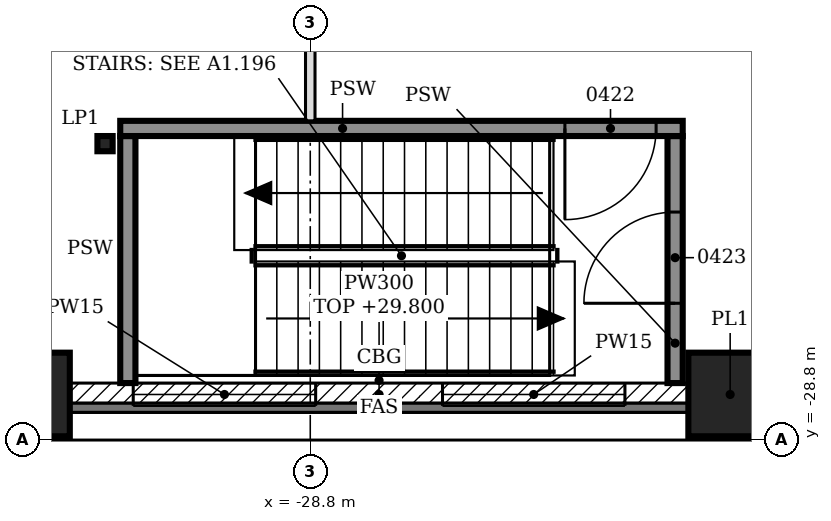
"""IFC4 building model, lengths in metres.
Left out: names, types, materials, properties, quantities, classifications, styles, units other than length and angle.
Written with IfcOpenShell. Run it as: python <this file> out.ifc"""

import sys

from ifc_helpers import new_model, si_unit, direction, frame, frame_2d, origin, origin_2d, place, context, subcontext, project, spatial, polyline, rectangle, hollow_rectangle, i_section, outline, extrude, element, fill, save


model = new_model("IFC4")
c1 = context("Model", 3, precision=1e-05, world=origin(), true_north=direction((0.0, 1.0)))
c2 = subcontext(c1, "Body", "Model", "MODEL_VIEW")
j1 = project(units=[si_unit("LENGTHUNIT", "METRE"), si_unit("PLANEANGLEUNIT", "RADIAN")], contexts=[c1])
p1 = place(None, origin())
s1 = spatial("IfcSite", under=j1, at=p1, CompositionType="ELEMENT")
p2 = place(p1, origin())
s2 = spatial("IfcBuilding", under=s1, at=p2, CompositionType="ELEMENT")
p3 = place(p2, frame((0.0, 0.0, 25.8)))
s3 = spatial("IfcBuildingStorey", under=s2, at=p3, CompositionType="ELEMENT", Elevation=25.8)
for number, where, z_axis, x_axis in (
    (1, (-32.514, -28.2, 0.0), (0.0, 0.0, 1.0), (1.0, 0.0, 0.0)),
    (2, (-23.276, -28.2, 0.0), (0.0, 0.0, 1.0), (1.0, 0.0, 0.0)),
):
    element("IfcColumn", number, at=place(p3, frame(where, z_axis=z_axis, x_axis=x_axis)), inside=s3, PredefinedType="COLUMN", context=c2, shape_type="SweptSolid", body=[
        extrude(hollow_rectangle(XDim=1.1, YDim=1.1, WallThickness=0.06, at=origin_2d()), origin(), (0.0, 0.0, 1.0), 4.8),
    ])
p4 = place(p3, frame((-31.5, -24.9, 0.0), z_axis=(0.0, 0.0, 1.0), x_axis=(1.0, 0.0, 0.0)))
e3 = element("IfcColumn", 3, at=p4, inside=s3, PredefinedType="COLUMN", context=c2, shape_type="SweptSolid", body=[
    extrude(i_section(OverallWidth=0.2, OverallDepth=0.2, WebThickness=0.009, FlangeThickness=0.015, FilletRadius=0.018, at=origin_2d()), origin(), (0.0, 0.0, 1.0), 4.8),
])
p5 = place(p3, frame((-31.964, -28.2, 0.0), z_axis=(0.0, 0.0, 1.0), x_axis=(1.0, 0.0, 0.0)))
e4 = element("IfcWall", 4, at=p5, inside=s3, PredefinedType="SOLIDWALL", context=c2, shape_type="SweptSolid", body=[
    extrude(rectangle(XDim=8.138, YDim=0.3, at=frame_2d((4.069, 0.0))), origin(), (0.0, 0.0, 1.0), 4.0),
])
p6 = place(p5, frame((0.834, 0.0, 0.9)))
e5 = element("IfcOpeningElement", 5, at=p6, cuts=e4, PredefinedType="OPENING", context=c2, shape_type="SweptSolid", body=[
    extrude(rectangle(XDim=2.4, YDim=1.5, at=frame_2d((1.2, 0.75))), frame((0.0, 0.16, 0.0), z_axis=(0.0, -1.0, 0.0), x_axis=(1.0, 0.0, 0.0)), (0.0, 0.0, 1.0), 0.32),
])
p7 = place(p5, frame((4.903, 0.0, 0.9)))
e6 = element("IfcOpeningElement", 6, at=p7, cuts=e4, PredefinedType="OPENING", context=c2, shape_type="SweptSolid", body=[
    extrude(rectangle(XDim=2.4, YDim=1.5, at=frame_2d((1.2, 0.75))), frame((0.0, 0.16, 0.0), z_axis=(0.0, -1.0, 0.0), x_axis=(1.0, 0.0, 0.0)), (0.0, 0.0, 1.0), 0.32),
])
p8 = place(p3, frame((-31.2, -28.05, 0.0), z_axis=(0.0, 0.0, 1.0), x_axis=(0.0, 1.0, 0.0)))
e7 = element("IfcWall", 7, at=p8, inside=s3, PredefinedType="SOLIDWALL", context=c2, shape_type="SweptSolid", body=[
    extrude(rectangle(XDim=3.25, YDim=0.2, at=frame_2d((1.625, 0.0))), origin(), (0.0, 0.0, 1.0), 4.6),
])
p9 = place(p3, frame((-24.0, -28.05, 0.0), z_axis=(0.0, 0.0, 1.0), x_axis=(0.0, 1.0, 0.0)))
e8 = element("IfcWall", 8, at=p9, inside=s3, PredefinedType="SOLIDWALL", context=c2, shape_type="SweptSolid", body=[
    extrude(rectangle(XDim=3.25, YDim=0.2, at=frame_2d((1.625, 0.0))), origin(), (0.0, 0.0, 1.0), 4.6),
])
p10 = place(p9, frame((1.05, 0.0, 0.0)))
e9 = element("IfcOpeningElement", 9, at=p10, cuts=e8, PredefinedType="OPENING", context=c2, shape_type="SweptSolid", body=[
    extrude(rectangle(XDim=1.2, YDim=2.1, at=frame_2d((0.6, 1.05))), frame((0.0, 0.11, 0.0), z_axis=(0.0, -1.0, 0.0), x_axis=(1.0, 0.0, 0.0)), (0.0, 0.0, 1.0), 0.22),
])
p11 = place(p3, frame((-31.3, -24.7, 0.0), z_axis=(0.0, 0.0, 1.0), x_axis=(1.0, 0.0, 0.0)))
e10 = element("IfcWall", 10, at=p11, inside=s3, PredefinedType="SOLIDWALL", context=c2, shape_type="SweptSolid", body=[
    extrude(rectangle(XDim=7.4, YDim=0.2, at=frame_2d((3.7, 0.0))), origin(), (0.0, 0.0, 1.0), 4.6),
])
p12 = place(p11, frame((5.85, 0.0, 0.0)))
e11 = element("IfcOpeningElement", 11, at=p12, cuts=e10, PredefinedType="OPENING", context=c2, shape_type="SweptSolid", body=[
    extrude(rectangle(XDim=1.2, YDim=2.1, at=frame_2d((0.6, 1.05))), frame((0.0, 0.11, 0.0), z_axis=(0.0, -1.0, 0.0), x_axis=(1.0, 0.0, 0.0)), (0.0, 0.0, 1.0), 0.22),
])
p13 = place(p3, frame((-28.8, -24.6, 0.0), z_axis=(0.0, 0.0, 1.0), x_axis=(0.0, 1.0, 0.0)))
e12 = element("IfcWall", 12, at=p13, inside=s3, PredefinedType="PARTITIONING", context=c2, shape_type="SweptSolid", body=[
    extrude(outline(polyline([(0.0, 0.0), (49.2, 0.0), (49.2, 4.6), (43.95, 4.6), (43.948, 3.98), (43.65, 3.98), (43.648, 4.6), (39.15, 4.6), (39.148, 3.98), (38.85, 3.98), (38.848, 4.6), (34.35, 4.6), (34.348, 3.98), (34.05, 3.98), (34.048, 4.6), (29.55, 4.6), (29.548, 3.98), (29.25, 3.98), (29.248, 4.6), (24.75, 4.6), (24.748, 3.98), (24.45, 3.98), (24.448, 4.6), (19.95, 4.6), (19.948, 3.98), (19.65, 3.98), (19.648, 4.6), (15.15, 4.6), (15.148, 3.98), (14.85, 3.98), (14.848, 4.6), (10.35, 4.6), (10.348, 3.98), (10.05, 3.98), (10.048, 4.6), (5.55, 4.6), (5.548, 3.98), (5.25, 3.98), (5.248, 4.6), (0.0, 4.6), (0.0, 0.0)])), frame((0.0, 0.062, 0.0), z_axis=(0.0, -1.0, 0.0), x_axis=(1.0, 0.0, 0.0)), (0.0, 0.0, 1.0), 0.125),
])
p14 = place(p13, frame((1.7, 0.0, 0.0)))
e13 = element("IfcOpeningElement", 13, at=p14, cuts=e12, PredefinedType="OPENING", context=c2, shape_type="SweptSolid", body=[
    extrude(rectangle(XDim=1.8, YDim=2.1, at=frame_2d((0.9, 1.05))), frame((0.0, 0.073, 0.0), z_axis=(0.0, -1.0, 0.0), x_axis=(1.0, 0.0, 0.0)), (0.0, 0.0, 1.0), 0.145),
])
p15 = place(p13, frame((8.05, 0.0, 0.0)))
e14 = element("IfcOpeningElement", 14, at=p15, cuts=e12, PredefinedType="OPENING", context=c2, shape_type="SweptSolid", body=[
    extrude(rectangle(XDim=1.8, YDim=2.1, at=frame_2d((0.9, 1.05))), frame((0.0, 0.073, 0.0), z_axis=(0.0, -1.0, 0.0), x_axis=(1.0, 0.0, 0.0)), (0.0, 0.0, 1.0), 0.145),
])
p16 = place(p13, frame((14.7, 0.0, 0.0)))
e15 = element("IfcOpeningElement", 15, at=p16, cuts=e12, PredefinedType="OPENING", context=c2, shape_type="SweptSolid", body=[
    extrude(rectangle(XDim=1.8, YDim=2.1, at=frame_2d((0.9, 1.05))), frame((0.0, 0.073, 0.0), z_axis=(0.0, -1.0, 0.0), x_axis=(1.0, 0.0, 0.0)), (0.0, 0.0, 1.0), 0.145),
])
p17 = place(p13, frame((21.2, 0.0, 0.0)))
e16 = element("IfcOpeningElement", 16, at=p17, cuts=e12, PredefinedType="OPENING", context=c2, shape_type="SweptSolid", body=[
    extrude(rectangle(XDim=1.8, YDim=2.1, at=frame_2d((0.9, 1.05))), frame((0.0, 0.073, 0.0), z_axis=(0.0, -1.0, 0.0), x_axis=(1.0, 0.0, 0.0)), (0.0, 0.0, 1.0), 0.145),
])
p18 = place(p13, frame((26.2, 0.0, 0.0)))
e17 = element("IfcOpeningElement", 17, at=p18, cuts=e12, PredefinedType="OPENING", context=c2, shape_type="SweptSolid", body=[
    extrude(rectangle(XDim=1.8, YDim=2.1, at=frame_2d((0.9, 1.05))), frame((0.0, 0.073, 0.0), z_axis=(0.0, -1.0, 0.0), x_axis=(1.0, 0.0, 0.0)), (0.0, 0.0, 1.0), 0.145),
])
p19 = place(p13, frame((32.7, 0.0, 0.0)))
e18 = element("IfcOpeningElement", 18, at=p19, cuts=e12, PredefinedType="OPENING", context=c2, shape_type="SweptSolid", body=[
    extrude(rectangle(XDim=1.8, YDim=2.1, at=frame_2d((0.9, 1.05))), frame((0.0, 0.073, 0.0), z_axis=(0.0, -1.0, 0.0), x_axis=(1.0, 0.0, 0.0)), (0.0, 0.0, 1.0), 0.145),
])
p20 = place(p13, frame((39.35, 0.0, 0.0)))
e19 = element("IfcOpeningElement", 19, at=p20, cuts=e12, PredefinedType="OPENING", context=c2, shape_type="SweptSolid", body=[
    extrude(rectangle(XDim=1.8, YDim=2.1, at=frame_2d((0.9, 1.05))), frame((0.0, 0.073, 0.0), z_axis=(0.0, -1.0, 0.0), x_axis=(1.0, 0.0, 0.0)), (0.0, 0.0, 1.0), 0.145),
])
p21 = place(p13, frame((45.7, 0.0, 0.0)))
e20 = element("IfcOpeningElement", 20, at=p21, cuts=e12, PredefinedType="OPENING", context=c2, shape_type="SweptSolid", body=[
    extrude(rectangle(XDim=1.8, YDim=2.1, at=frame_2d((0.9, 1.05))), frame((0.0, 0.073, 0.0), z_axis=(0.0, -1.0, 0.0), x_axis=(1.0, 0.0, 0.0)), (0.0, 0.0, 1.0), 0.145),
])
p22 = place(p6, origin())
e21 = element("IfcWindow", 21, at=p22, inside=s3, PartitioningType="SINGLE_PANEL", PredefinedType="WINDOW", context=c2, shape_type="SweptSolid", body=[
    extrude(rectangle(XDim=2.4, YDim=1.5, at=frame_2d((1.2, 0.75))), frame((0.0, 0.03, 0.0), z_axis=(0.0, -1.0, 0.0), x_axis=(1.0, 0.0, 0.0)), (0.0, 0.0, 1.0), 0.06),
])
fill(e5, e21)
p23 = place(p7, origin())
e22 = element("IfcWindow", 22, at=p23, inside=s3, PartitioningType="SINGLE_PANEL", PredefinedType="WINDOW", context=c2, shape_type="SweptSolid", body=[
    extrude(rectangle(XDim=2.4, YDim=1.5, at=frame_2d((1.2, 0.75))), frame((0.0, 0.03, 0.0), z_axis=(0.0, -1.0, 0.0), x_axis=(1.0, 0.0, 0.0)), (0.0, 0.0, 1.0), 0.06),
])
fill(e6, e22)
p24 = place(p12, frame((1.2, 0.0, 0.0), z_axis=(0.0, 0.0, 1.0), x_axis=(-1.0, 0.0, 0.0)))
e23 = element("IfcDoor", 23, at=p24, inside=s3, OperationType="SINGLE_SWING_RIGHT", PredefinedType="DOOR", context=c2, shape_type="SweptSolid", body=[
    extrude(rectangle(XDim=1.2, YDim=2.1, at=frame_2d((0.6, 1.05))), frame((0.0, 0.025, 0.0), z_axis=(0.0, -1.0, 0.0), x_axis=(1.0, 0.0, 0.0)), (0.0, 0.0, 1.0), 0.05),
])
fill(e11, e23)
p25 = place(p10, origin())
e24 = element("IfcDoor", 24, at=p25, inside=s3, OperationType="SINGLE_SWING_LEFT", PredefinedType="DOOR", context=c2, shape_type="SweptSolid", body=[
    extrude(rectangle(XDim=1.2, YDim=2.1, at=frame_2d((0.6, 1.05))), frame((0.0, 0.025, 0.0), z_axis=(0.0, -1.0, 0.0), x_axis=(1.0, 0.0, 0.0)), (0.0, 0.0, 1.0), 0.05),
])
fill(e9, e24)
save(model, sys.argv[1])
